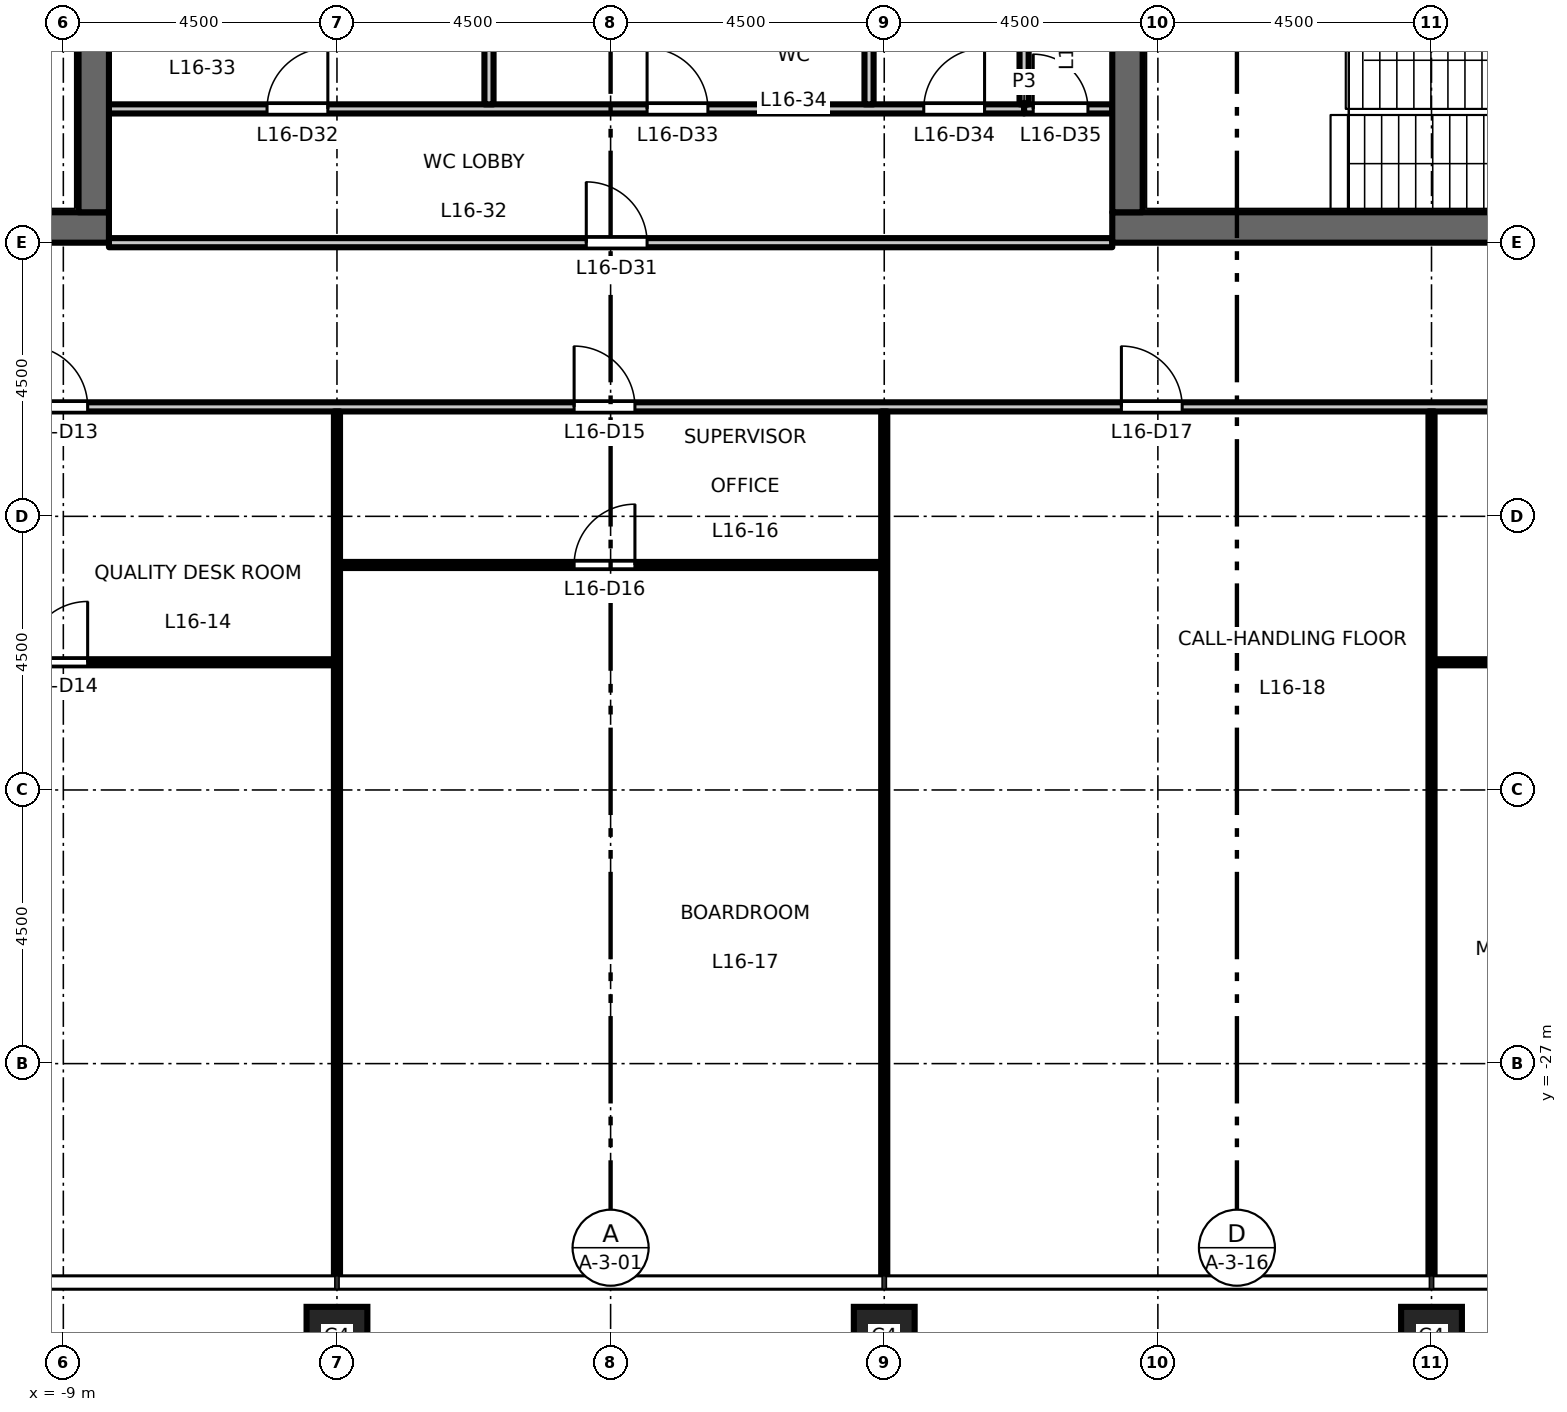
"""IFC4 building model, lengths in metres.
Left out: names, types, materials, properties, quantities, classifications, styles, units other than length and angle.
Written with IfcOpenShell. Run it as: python <this file> out.ifc"""

import sys

from ifc_helpers import new_model, si_unit, direction, frame, frame_2d, origin, origin_2d, place, context, subcontext, project, spatial, rectangle, hollow_rectangle, extrude, element, fill, save


model = new_model("IFC4")
c1 = context("Model", 3, precision=1e-05, world=origin(), true_north=direction((0.0, 1.0)))
c2 = subcontext(c1, "Body", "Model", "MODEL_VIEW")
j1 = project(units=[si_unit("LENGTHUNIT", "METRE"), si_unit("PLANEANGLEUNIT", "RADIAN")], contexts=[c1])
p1 = place(None, origin())
s1 = spatial("IfcSite", under=j1, at=p1, CompositionType="ELEMENT")
p2 = place(p1, origin())
s2 = spatial("IfcBuilding", under=s1, at=p2, CompositionType="ELEMENT")
p3 = place(p2, frame((0.0, 0.0, 76.2)))
s3 = spatial("IfcBuildingStorey", under=s2, at=p3, CompositionType="ELEMENT", Elevation=76.2)
for number, where, z_axis, x_axis in (
    (1, (-4.5, -31.5, 0.0), (0.0, 0.0, 1.0), (1.0, 0.0, 0.0)),
    (2, (4.5, -31.5, 0.0), (0.0, 0.0, 1.0), (1.0, 0.0, 0.0)),
    (3, (13.5, -31.5, 0.0), (0.0, 0.0, 1.0), (1.0, 0.0, 0.0)),
):
    element("IfcColumn", number, at=place(p3, frame(where, z_axis=z_axis, x_axis=x_axis)), inside=s3, PredefinedType="COLUMN", context=c2, shape_type="SweptSolid", body=[
        extrude(hollow_rectangle(XDim=1.0, YDim=1.0, WallThickness=0.06, at=origin_2d()), origin(), (0.0, 0.0, 1.0), 4.5),
    ])
p4 = place(p3, frame((-8.25, -13.25, 0.0), z_axis=(0.0, 0.0, 1.0), x_axis=(-1.0, 0.0, 0.0)))
e4 = element("IfcWall", 4, at=p4, inside=s3, PredefinedType="SHEAR", context=c2, shape_type="SweptSolid", body=[
    extrude(rectangle(XDim=13.5, YDim=0.5, at=frame_2d((6.75, 0.0))), origin(), (0.0, 0.0, 1.0), 4.35),
])
p5 = place(p3, frame((-8.5, -13.0, 0.0), z_axis=(0.0, 0.0, 1.0), x_axis=(0.0, 1.0, 0.0)))
e5 = element("IfcWall", 5, at=p5, inside=s3, PredefinedType="SHEAR", context=c2, shape_type="SweptSolid", body=[
    extrude(rectangle(XDim=26.0, YDim=0.5, at=frame_2d((13.0, 0.0))), origin(), (0.0, 0.0, 1.0), 4.35),
])
p6 = place(p3, frame((8.25, -13.25, 0.0), z_axis=(0.0, 0.0, 1.0), x_axis=(1.0, 0.0, 0.0)))
e6 = element("IfcWall", 6, at=p6, inside=s3, PredefinedType="SHEAR", context=c2, shape_type="SweptSolid", body=[
    extrude(rectangle(XDim=13.5, YDim=0.5, at=frame_2d((6.75, 0.0))), origin(), (0.0, 0.0, 1.0), 4.35),
])
p7 = place(p3, frame((8.5, -13.0, 0.0), z_axis=(0.0, 0.0, 1.0), x_axis=(0.0, 1.0, 0.0)))
e7 = element("IfcWall", 7, at=p7, inside=s3, PredefinedType="SHEAR", context=c2, shape_type="SweptSolid", body=[
    extrude(rectangle(XDim=26.0, YDim=0.5, at=frame_2d((13.0, 0.0))), origin(), (0.0, 0.0, 1.0), 4.35),
])
p8 = place(p3, frame((-22.45, -20.4, 0.0), z_axis=(0.0, 0.0, 1.0), x_axis=(1.0, 0.0, 0.0)))
e8 = element("IfcWall", 8, at=p8, inside=s3, PredefinedType="PARTITIONING", context=c2, shape_type="SweptSolid", body=[
    extrude(rectangle(XDim=17.9, YDim=0.1, at=frame_2d((8.95, 0.0))), origin(), (0.0, 0.0, 1.0), 4.35),
])
p9 = place(p8, frame((3.85, 0.0, 0.0)))
e9 = element("IfcOpeningElement", 9, at=p9, cuts=e8, PredefinedType="OPENING", context=c2, shape_type="SweptSolid", body=[
    extrude(rectangle(XDim=1.0, YDim=2.1, at=frame_2d((0.5, 1.05))), frame((0.0, 0.06, 0.0), z_axis=(0.0, -1.0, 0.0), x_axis=(1.0, 0.0, 0.0)), (0.0, 0.0, 1.0), 0.12),
])
p10 = place(p8, frame((12.85, 0.0, 0.0)))
e10 = element("IfcOpeningElement", 10, at=p10, cuts=e8, PredefinedType="OPENING", context=c2, shape_type="SweptSolid", body=[
    extrude(rectangle(XDim=1.0, YDim=2.1, at=frame_2d((0.5, 1.05))), frame((0.0, 0.06, 0.0), z_axis=(0.0, -1.0, 0.0), x_axis=(1.0, 0.0, 0.0)), (0.0, 0.0, 1.0), 0.12),
])
p11 = place(p3, frame((13.55, -20.4, 0.0), z_axis=(0.0, 0.0, 1.0), x_axis=(1.0, 0.0, 0.0)))
e11 = element("IfcWall", 11, at=p11, inside=s3, PredefinedType="PARTITIONING", context=c2, shape_type="SweptSolid", body=[
    extrude(rectangle(XDim=16.96, YDim=0.1, at=frame_2d((8.48, 0.0))), origin(), (0.0, 0.0, 1.0), 4.35),
])
p12 = place(p11, frame((3.85, 0.0, 0.0)))
e12 = element("IfcOpeningElement", 12, at=p12, cuts=e11, PredefinedType="OPENING", context=c2, shape_type="SweptSolid", body=[
    extrude(rectangle(XDim=1.0, YDim=2.1, at=frame_2d((0.5, 1.05))), frame((0.0, 0.06, 0.0), z_axis=(0.0, -1.0, 0.0), x_axis=(1.0, 0.0, 0.0)), (0.0, 0.0, 1.0), 0.12),
])
p13 = place(p11, frame((12.35, 0.0, 0.0)))
e13 = element("IfcOpeningElement", 13, at=p13, cuts=e11, PredefinedType="OPENING", context=c2, shape_type="SweptSolid", body=[
    extrude(rectangle(XDim=1.0, YDim=2.1, at=frame_2d((0.5, 1.05))), frame((0.0, 0.06, 0.0), z_axis=(0.0, -1.0, 0.0), x_axis=(1.0, 0.0, 0.0)), (0.0, 0.0, 1.0), 0.12),
])
p14 = place(p3, frame((-4.45, -18.8, 0.0), z_axis=(0.0, 0.0, 1.0), x_axis=(1.0, 0.0, 0.0)))
e14 = element("IfcWall", 14, at=p14, inside=s3, PredefinedType="PARTITIONING", context=c2, shape_type="SweptSolid", body=[
    extrude(rectangle(XDim=8.9, YDim=0.1, at=frame_2d((4.45, 0.0))), origin(), (0.0, 0.0, 1.0), 4.35),
])
p15 = place(p14, frame((3.85, 0.0, 0.0)))
e15 = element("IfcOpeningElement", 15, at=p15, cuts=e14, PredefinedType="OPENING", context=c2, shape_type="SweptSolid", body=[
    extrude(rectangle(XDim=1.0, YDim=2.1, at=frame_2d((0.5, 1.05))), frame((0.0, 0.06, 0.0), z_axis=(0.0, -1.0, 0.0), x_axis=(1.0, 0.0, 0.0)), (0.0, 0.0, 1.0), 0.12),
])
p16 = place(p3, frame((-30.51, -16.2, 0.0), z_axis=(0.0, 0.0, 1.0), x_axis=(1.0, 0.0, 0.0)))
e16 = element("IfcWall", 16, at=p16, inside=s3, PredefinedType="PARTITIONING", context=c2, shape_type="SweptSolid", body=[
    extrude(rectangle(XDim=61.02, YDim=0.15, at=frame_2d((30.51, 0.0))), origin(), (0.0, 0.0, 1.0), 4.35),
])
p17 = place(p16, frame((11.91, 0.0, 0.0)))
e17 = element("IfcOpeningElement", 17, at=p17, cuts=e16, PredefinedType="OPENING", context=c2, shape_type="SweptSolid", body=[
    extrude(rectangle(XDim=1.0, YDim=2.1, at=frame_2d((0.5, 1.05))), frame((0.0, 0.085, 0.0), z_axis=(0.0, -1.0, 0.0), x_axis=(1.0, 0.0, 0.0)), (0.0, 0.0, 1.0), 0.17),
])
p18 = place(p16, frame((20.91, 0.0, 0.0)))
e18 = element("IfcOpeningElement", 18, at=p18, cuts=e16, PredefinedType="OPENING", context=c2, shape_type="SweptSolid", body=[
    extrude(rectangle(XDim=1.0, YDim=2.1, at=frame_2d((0.5, 1.05))), frame((0.0, 0.085, 0.0), z_axis=(0.0, -1.0, 0.0), x_axis=(1.0, 0.0, 0.0)), (0.0, 0.0, 1.0), 0.17),
])
p19 = place(p16, frame((29.91, 0.0, 0.0)))
e19 = element("IfcOpeningElement", 19, at=p19, cuts=e16, PredefinedType="OPENING", context=c2, shape_type="SweptSolid", body=[
    extrude(rectangle(XDim=1.0, YDim=2.1, at=frame_2d((0.5, 1.05))), frame((0.0, 0.085, 0.0), z_axis=(0.0, -1.0, 0.0), x_axis=(1.0, 0.0, 0.0)), (0.0, 0.0, 1.0), 0.17),
])
p20 = place(p16, frame((38.91, 0.0, 0.0)))
e20 = element("IfcOpeningElement", 20, at=p20, cuts=e16, PredefinedType="OPENING", context=c2, shape_type="SweptSolid", body=[
    extrude(rectangle(XDim=1.0, YDim=2.1, at=frame_2d((0.5, 1.05))), frame((0.0, 0.085, 0.0), z_axis=(0.0, -1.0, 0.0), x_axis=(1.0, 0.0, 0.0)), (0.0, 0.0, 1.0), 0.17),
])
p21 = place(p16, frame((47.91, 0.0, 0.0)))
e21 = element("IfcOpeningElement", 21, at=p21, cuts=e16, PredefinedType="OPENING", context=c2, shape_type="SweptSolid", body=[
    extrude(rectangle(XDim=1.0, YDim=2.1, at=frame_2d((0.5, 1.05))), frame((0.0, 0.085, 0.0), z_axis=(0.0, -1.0, 0.0), x_axis=(1.0, 0.0, 0.0)), (0.0, 0.0, 1.0), 0.17),
])
p22 = place(p16, frame((3.4, 0.0, 0.0)))
e22 = element("IfcOpeningElement", 22, at=p22, cuts=e16, PredefinedType="OPENING", context=c2, shape_type="SweptSolid", body=[
    extrude(rectangle(XDim=1.0, YDim=2.1, at=frame_2d((0.5, 1.05))), frame((0.0, 0.085, 0.0), z_axis=(0.0, -1.0, 0.0), x_axis=(1.0, 0.0, 0.0)), (0.0, 0.0, 1.0), 0.17),
])
p23 = place(p16, frame((56.41, 0.0, 0.0)))
e23 = element("IfcOpeningElement", 23, at=p23, cuts=e16, PredefinedType="OPENING", context=c2, shape_type="SweptSolid", body=[
    extrude(rectangle(XDim=1.0, YDim=2.1, at=frame_2d((0.5, 1.05))), frame((0.0, 0.085, 0.0), z_axis=(0.0, -1.0, 0.0), x_axis=(1.0, 0.0, 0.0)), (0.0, 0.0, 1.0), 0.17),
])
p24 = place(p3, frame((-8.25, -13.5, 0.0), z_axis=(0.0, 0.0, 1.0), x_axis=(1.0, 0.0, 0.0)))
e24 = element("IfcWall", 24, at=p24, inside=s3, PredefinedType="PARTITIONING", context=c2, shape_type="SweptSolid", body=[
    extrude(rectangle(XDim=16.5, YDim=0.15, at=frame_2d((8.25, 0.0))), origin(), (0.0, 0.0, 1.0), 3.85),
])
p25 = place(p24, frame((7.85, 0.0, 0.0)))
e25 = element("IfcOpeningElement", 25, at=p25, cuts=e24, PredefinedType="OPENING", context=c2, shape_type="SweptSolid", body=[
    extrude(rectangle(XDim=1.0, YDim=2.1, at=frame_2d((0.5, 1.05))), frame((0.0, 0.085, 0.0), z_axis=(0.0, -1.0, 0.0), x_axis=(1.0, 0.0, 0.0)), (0.0, 0.0, 1.0), 0.17),
])
p26 = place(p3, frame((-8.25, -11.3, 0.0), z_axis=(0.0, 0.0, 1.0), x_axis=(1.0, 0.0, 0.0)))
e26 = element("IfcWall", 26, at=p26, inside=s3, PredefinedType="PARTITIONING", context=c2, shape_type="SweptSolid", body=[
    extrude(rectangle(XDim=15.05, YDim=0.15, at=frame_2d((7.525, 0.0))), origin(), (0.0, 0.0, 1.0), 4.35),
])
p27 = place(p26, frame((2.6, 0.0, 0.0)))
e27 = element("IfcOpeningElement", 27, at=p27, cuts=e26, PredefinedType="OPENING", context=c2, shape_type="SweptSolid", body=[
    extrude(rectangle(XDim=1.0, YDim=2.1, at=frame_2d((0.5, 1.05))), frame((0.0, 0.085, 0.0), z_axis=(0.0, -1.0, 0.0), x_axis=(1.0, 0.0, 0.0)), (0.0, 0.0, 1.0), 0.17),
])
p28 = place(p26, frame((8.85, 0.0, 0.0)))
e28 = element("IfcOpeningElement", 28, at=p28, cuts=e26, PredefinedType="OPENING", context=c2, shape_type="SweptSolid", body=[
    extrude(rectangle(XDim=1.0, YDim=2.1, at=frame_2d((0.5, 1.05))), frame((0.0, 0.085, 0.0), z_axis=(0.0, -1.0, 0.0), x_axis=(1.0, 0.0, 0.0)), (0.0, 0.0, 1.0), 0.17),
])
p29 = place(p26, frame((13.4, 0.0, 0.0)))
e29 = element("IfcOpeningElement", 29, at=p29, cuts=e26, PredefinedType="OPENING", context=c2, shape_type="SweptSolid", body=[
    extrude(rectangle(XDim=1.0, YDim=2.1, at=frame_2d((0.5, 1.05))), frame((0.0, 0.085, 0.0), z_axis=(0.0, -1.0, 0.0), x_axis=(1.0, 0.0, 0.0)), (0.0, 0.0, 1.0), 0.17),
])
p30 = place(p3, frame((6.8, -11.3, 0.0), z_axis=(0.0, 0.0, 1.0), x_axis=(1.0, 0.0, 0.0)))
e30 = element("IfcWall", 30, at=p30, inside=s3, PredefinedType="PARTITIONING", context=c2, shape_type="SweptSolid", body=[
    extrude(rectangle(XDim=1.45, YDim=0.15, at=frame_2d((0.725, 0.0))), origin(), (0.0, 0.0, 1.0), 4.35),
])
p31 = place(p30, frame((0.15, 0.0, 0.0)))
e31 = element("IfcOpeningElement", 31, at=p31, cuts=e30, PredefinedType="OPENING", context=c2, shape_type="SweptSolid", body=[
    extrude(rectangle(XDim=0.9, YDim=2.1, at=frame_2d((0.45, 1.05))), frame((0.0, 0.085, 0.0), z_axis=(0.0, -1.0, 0.0), x_axis=(1.0, 0.0, 0.0)), (0.0, 0.0, 1.0), 0.17),
])
p32 = place(p3, frame((-4.5, -30.51, 0.0), z_axis=(0.0, 0.0, 1.0), x_axis=(0.0, 1.0, 0.0)))
e32 = element("IfcWall", 32, at=p32, inside=s3, PredefinedType="PARTITIONING", context=c2, shape_type="SweptSolid", body=[
    extrude(rectangle(XDim=14.235, YDim=0.1, at=frame_2d((7.118, 0.0))), origin(), (0.0, 0.0, 1.0), 3.35),
])
for number, where, z_axis, x_axis in (
    (33, (-2.0, -11.225, 0.0), (0.0, 0.0, 1.0), (0.0, 1.0, 0.0)),
    (34, (4.25, -11.225, 0.0), (0.0, 0.0, 1.0), (0.0, 1.0, 0.0)),
):
    element("IfcWall", number, at=place(p3, frame(where, z_axis=z_axis, x_axis=x_axis)), inside=s3, PredefinedType="PARTITIONING", context=c2, shape_type="SweptSolid", body=[
        extrude(rectangle(XDim=2.855, YDim=0.15, at=frame_2d((1.427, 0.0))), origin(), (0.0, 0.0, 1.0), 4.35),
    ])
p33 = place(p3, frame((4.5, -30.51, 0.0), z_axis=(0.0, 0.0, 1.0), x_axis=(0.0, 1.0, 0.0)))
e35 = element("IfcWall", 35, at=p33, inside=s3, PredefinedType="PARTITIONING", context=c2, shape_type="SweptSolid", body=[
    extrude(rectangle(XDim=14.235, YDim=0.1, at=frame_2d((7.118, 0.0))), origin(), (0.0, 0.0, 1.0), 3.35),
])
p34 = place(p3, frame((6.8, -11.225, 0.0), z_axis=(0.0, 0.0, 1.0), x_axis=(0.0, 1.0, 0.0)))
e36 = element("IfcWall", 36, at=p34, inside=s3, PredefinedType="PARTITIONING", context=c2, shape_type="SweptSolid", body=[
    extrude(rectangle(XDim=3.151, YDim=0.15, at=frame_2d((1.576, 0.0))), origin(), (0.0, 0.0, 1.0), 4.35),
])
p35 = place(p3, frame((13.5, -30.51, 0.0), z_axis=(0.0, 0.0, 1.0), x_axis=(0.0, 1.0, 0.0)))
e37 = element("IfcWall", 37, at=p35, inside=s3, PredefinedType="PARTITIONING", context=c2, shape_type="SweptSolid", body=[
    extrude(rectangle(XDim=14.235, YDim=0.1, at=frame_2d((7.118, 0.0))), origin(), (0.0, 0.0, 1.0), 3.35),
])
p36 = place(p18, origin())
e38 = element("IfcDoor", 38, at=p36, inside=s3, OperationType="SINGLE_SWING_LEFT", PredefinedType="DOOR", context=c2, shape_type="SweptSolid", body=[
    extrude(rectangle(XDim=1.0, YDim=2.1, at=frame_2d((0.5, 1.05))), frame((0.0, 0.025, 0.0), z_axis=(0.0, -1.0, 0.0), x_axis=(1.0, 0.0, 0.0)), (0.0, 0.0, 1.0), 0.05),
])
fill(e18, e38)
p37 = place(p10, origin())
e39 = element("IfcDoor", 39, at=p37, inside=s3, OperationType="SINGLE_SWING_RIGHT", PredefinedType="DOOR", context=c2, shape_type="SweptSolid", body=[
    extrude(rectangle(XDim=1.0, YDim=2.1, at=frame_2d((0.5, 1.05))), frame((0.0, 0.025, 0.0), z_axis=(0.0, -1.0, 0.0), x_axis=(1.0, 0.0, 0.0)), (0.0, 0.0, 1.0), 0.05),
])
fill(e10, e39)
p38 = place(p19, origin())
e40 = element("IfcDoor", 40, at=p38, inside=s3, OperationType="SINGLE_SWING_LEFT", PredefinedType="DOOR", context=c2, shape_type="SweptSolid", body=[
    extrude(rectangle(XDim=1.0, YDim=2.1, at=frame_2d((0.5, 1.05))), frame((0.0, 0.025, 0.0), z_axis=(0.0, -1.0, 0.0), x_axis=(1.0, 0.0, 0.0)), (0.0, 0.0, 1.0), 0.05),
])
fill(e19, e40)
p39 = place(p15, origin())
e41 = element("IfcDoor", 41, at=p39, inside=s3, OperationType="SINGLE_SWING_RIGHT", PredefinedType="DOOR", context=c2, shape_type="SweptSolid", body=[
    extrude(rectangle(XDim=1.0, YDim=2.1, at=frame_2d((0.5, 1.05))), frame((0.0, 0.025, 0.0), z_axis=(0.0, -1.0, 0.0), x_axis=(1.0, 0.0, 0.0)), (0.0, 0.0, 1.0), 0.05),
])
fill(e15, e41)
p40 = place(p20, origin())
e42 = element("IfcDoor", 42, at=p40, inside=s3, OperationType="SINGLE_SWING_LEFT", PredefinedType="DOOR", context=c2, shape_type="SweptSolid", body=[
    extrude(rectangle(XDim=1.0, YDim=2.1, at=frame_2d((0.5, 1.05))), frame((0.0, 0.025, 0.0), z_axis=(0.0, -1.0, 0.0), x_axis=(1.0, 0.0, 0.0)), (0.0, 0.0, 1.0), 0.05),
])
fill(e20, e42)
p41 = place(p25, origin())
e43 = element("IfcDoor", 43, at=p41, inside=s3, OperationType="SINGLE_SWING_LEFT", PredefinedType="DOOR", context=c2, shape_type="SweptSolid", body=[
    extrude(rectangle(XDim=1.0, YDim=2.1, at=frame_2d((0.5, 1.05))), frame((0.0, 0.025, 0.0), z_axis=(0.0, -1.0, 0.0), x_axis=(1.0, 0.0, 0.0)), (0.0, 0.0, 1.0), 0.05),
])
fill(e25, e43)
p42 = place(p27, origin())
e44 = element("IfcDoor", 44, at=p42, inside=s3, OperationType="SINGLE_SWING_RIGHT", PredefinedType="DOOR", context=c2, shape_type="SweptSolid", body=[
    extrude(rectangle(XDim=1.0, YDim=2.1, at=frame_2d((0.5, 1.05))), frame((0.0, 0.025, 0.0), z_axis=(0.0, -1.0, 0.0), x_axis=(1.0, 0.0, 0.0)), (0.0, 0.0, 1.0), 0.05),
])
fill(e27, e44)
p43 = place(p28, origin())
e45 = element("IfcDoor", 45, at=p43, inside=s3, OperationType="SINGLE_SWING_LEFT", PredefinedType="DOOR", context=c2, shape_type="SweptSolid", body=[
    extrude(rectangle(XDim=1.0, YDim=2.1, at=frame_2d((0.5, 1.05))), frame((0.0, 0.025, 0.0), z_axis=(0.0, -1.0, 0.0), x_axis=(1.0, 0.0, 0.0)), (0.0, 0.0, 1.0), 0.05),
])
fill(e28, e45)
p44 = place(p29, origin())
e46 = element("IfcDoor", 46, at=p44, inside=s3, OperationType="SINGLE_SWING_RIGHT", PredefinedType="DOOR", context=c2, shape_type="SweptSolid", body=[
    extrude(rectangle(XDim=1.0, YDim=2.1, at=frame_2d((0.5, 1.05))), frame((0.0, 0.025, 0.0), z_axis=(0.0, -1.0, 0.0), x_axis=(1.0, 0.0, 0.0)), (0.0, 0.0, 1.0), 0.05),
])
fill(e29, e46)
p45 = place(p31, origin())
e47 = element("IfcDoor", 47, at=p45, inside=s3, OperationType="SINGLE_SWING_LEFT", PredefinedType="DOOR", context=c2, shape_type="SweptSolid", body=[
    extrude(rectangle(XDim=0.9, YDim=2.1, at=frame_2d((0.45, 1.05))), frame((0.0, 0.025, 0.0), z_axis=(0.0, -1.0, 0.0), x_axis=(1.0, 0.0, 0.0)), (0.0, 0.0, 1.0), 0.05),
])
fill(e31, e47)
save(model, sys.argv[1])
